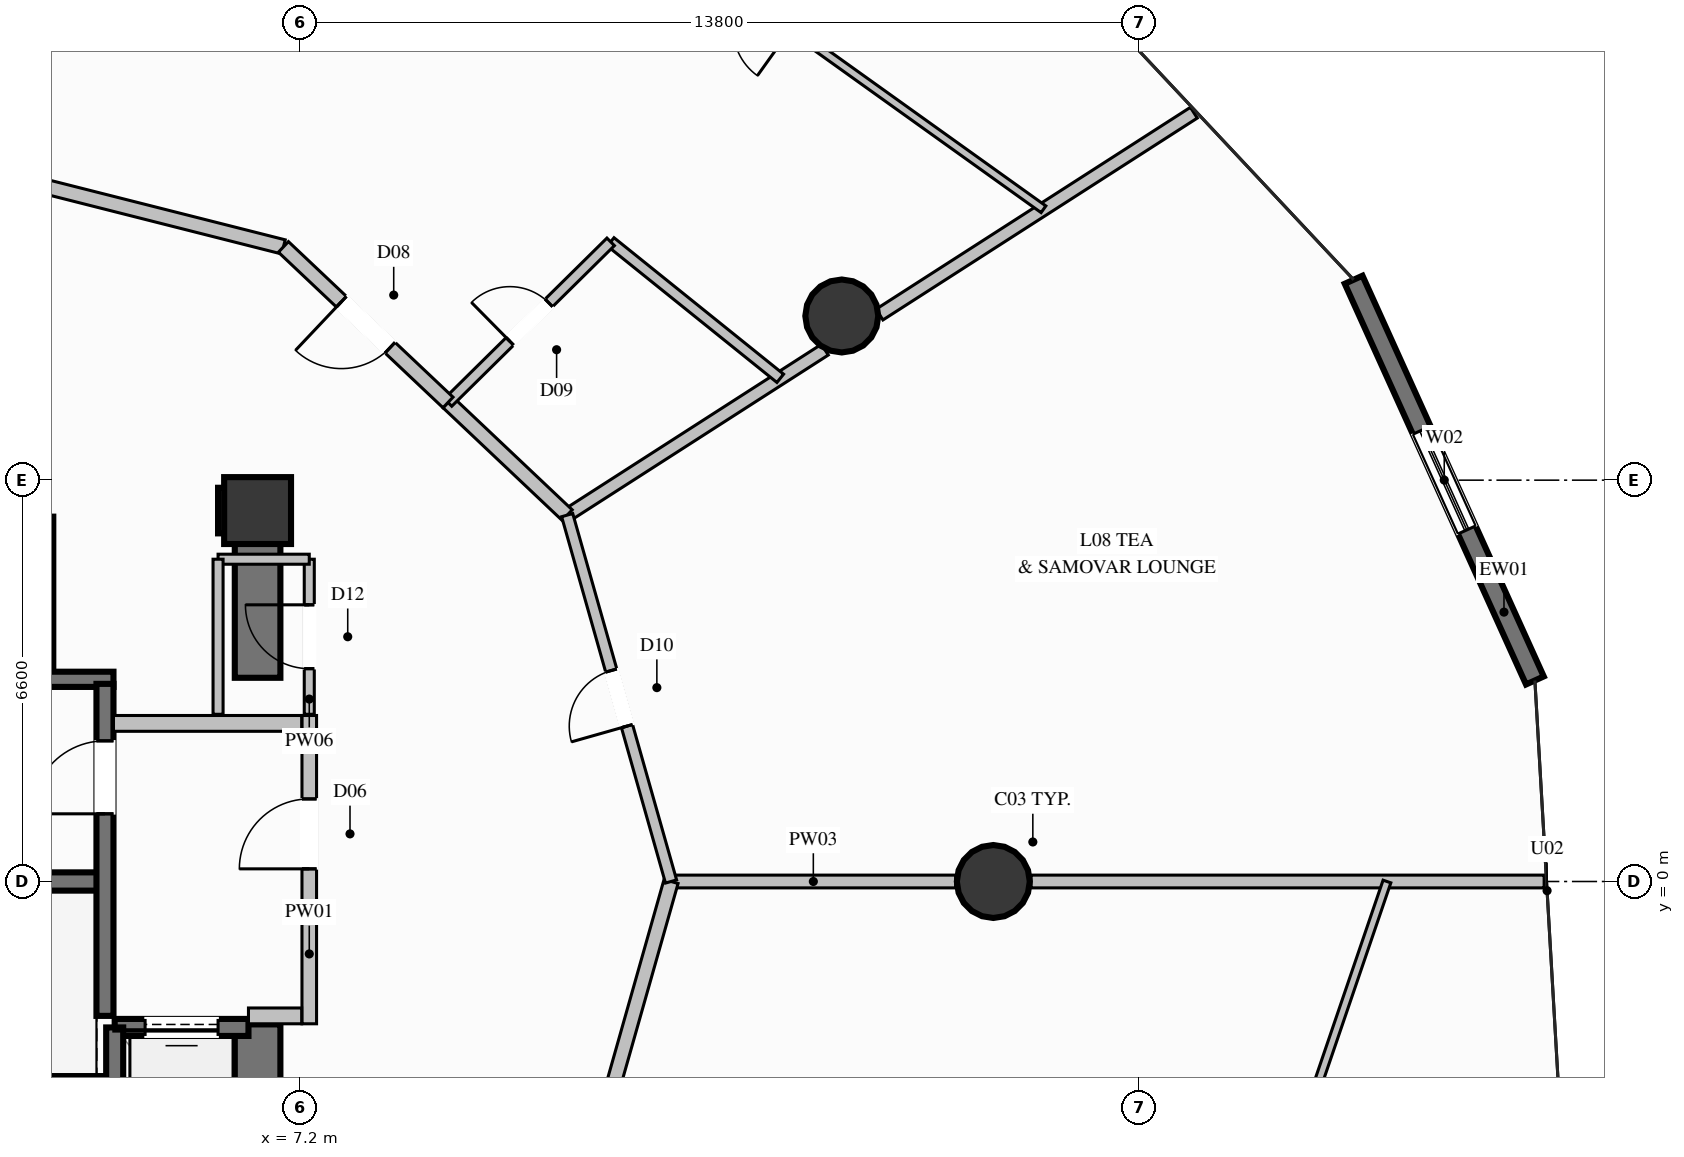
"""IFC4 building model, lengths in metres.
Left out: names, types, materials, properties, quantities, classifications, styles, units other than length and angle.
Written with IfcOpenShell. Run it as: python <this file> out.ifc"""

import sys

from ifc_helpers import new_model, si_unit, direction, frame, frame_2d, origin, origin_2d, place, context, subcontext, project, spatial, rectangle, circle, extrude, element, fill, save


model = new_model("IFC4")
c1 = context("Model", 3, precision=1e-05, world=origin(), true_north=direction((0.0, 1.0)))
c2 = subcontext(c1, "Body", "Model", "MODEL_VIEW")
j1 = project(units=[si_unit("LENGTHUNIT", "METRE"), si_unit("PLANEANGLEUNIT", "RADIAN")], contexts=[c1])
p1 = place(None, origin())
s1 = spatial("IfcSite", under=j1, at=p1, CompositionType="ELEMENT")
p2 = place(p1, origin())
s2 = spatial("IfcBuilding", under=s1, at=p2, CompositionType="ELEMENT")
p3 = place(p2, frame((0.0, 0.0, 39.2)))
s3 = spatial("IfcBuildingStorey", under=s2, at=p3, CompositionType="ELEMENT", Elevation=39.2)
p4 = place(p3, frame((6.5, 6.1, 0.0), z_axis=(0.0, 0.0, 1.0), x_axis=(1.0, 0.0, 0.0)))
e1 = element("IfcColumn", 1, at=p4, inside=s3, PredefinedType="COLUMN", context=c2, shape_type="SweptSolid", body=[
    extrude(rectangle(XDim=1.1, YDim=1.1, at=origin_2d()), origin(), (0.0, 0.0, 1.0), 3.6),
])
p5 = place(p3, frame((-3.99, 0.0, 0.0), z_axis=(0.0, 0.0, 1.0), x_axis=(1.0, 0.0, 0.0)))
e2 = element("IfcWall", 2, at=p5, inside=s3, PredefinedType="SHEAR", context=c2, shape_type="SweptSolid", body=[
    extrude(rectangle(XDim=7.98, YDim=0.3, at=frame_2d((3.99, 0.0))), origin(), (0.0, 0.0, 1.0), 3.6),
])
for number, where, z_axis, x_axis in (
    (3, (-4.13, -3.325, 0.0), (0.0, 0.0, 1.0), (1.0, 0.0, 0.0)),
    (4, (-4.13, 3.325, 0.0), (0.0, 0.0, 1.0), (1.0, 0.0, 0.0)),
):
    element("IfcWall", number, at=place(p3, frame(where, z_axis=z_axis, x_axis=x_axis)), inside=s3, PredefinedType="SOLIDWALL", context=c2, shape_type="SweptSolid", body=[
        extrude(rectangle(XDim=8.26, YDim=0.25, at=frame_2d((4.13, 0.0))), origin(), (0.0, 0.0, 1.0), 3.6),
    ])
p6 = place(p3, frame((5.85, 6.1, 0.0), z_axis=(0.0, 0.0, 1.0), x_axis=(1.0, 0.0, 0.0)))
e5 = element("IfcWall", 5, at=p6, inside=s3, PredefinedType="SHEAR", context=c2, shape_type="SweptSolid", body=[
    extrude(rectangle(XDim=0.275, YDim=0.75, at=frame_2d((0.137, 0.0))), origin(), (0.0, 0.0, 1.0), 3.6),
])
p7 = place(p3, frame((6.5, -6.475, 0.0), z_axis=(0.0, 0.0, 1.0), x_axis=(0.0, 1.0, 0.0)))
e6 = element("IfcWall", 6, at=p7, inside=s3, PredefinedType="SHEAR", context=c2, shape_type="SweptSolid", body=[
    extrude(rectangle(XDim=4.125, YDim=0.75, at=frame_2d((2.062, 0.0))), origin(), (0.0, 0.0, 1.0), 3.6),
])
p8 = place(p3, frame((6.5, 3.35, 0.0), z_axis=(0.0, 0.0, 1.0), x_axis=(0.0, 1.0, 0.0)))
e7 = element("IfcWall", 7, at=p8, inside=s3, PredefinedType="SHEAR", context=c2, shape_type="SweptSolid", body=[
    extrude(rectangle(XDim=3.125, YDim=0.75, at=frame_2d((1.562, 0.0))), origin(), (0.0, 0.0, 1.0), 3.6),
])
for number, where, z_axis, x_axis in (
    (8, (18.6, 0.0, 0.0), (0.0, 0.0, 1.0), (1.0, 0.0, 0.0)),
    (9, (16.108, 9.3, 0.0), (0.0, 0.0, 1.0), (1.0, 0.0, 0.0)),
):
    element("IfcColumn", number, at=place(p3, frame(where, z_axis=z_axis, x_axis=x_axis)), inside=s3, PredefinedType="COLUMN", context=c2, shape_type="SweptSolid", body=[
        extrude(circle(Radius=0.6, at=origin_2d()), origin(), (0.0, 0.0, 1.0), 3.6),
    ])
p9 = place(p3, frame((24.526, 9.896, 0.0), z_axis=(0.0, 0.0, 1.0), x_axis=(0.412164534208, -0.911109431814, 0.0)))
e10 = element("IfcWall", 10, at=p9, inside=s3, PredefinedType="SOLIDWALL", context=c2, shape_type="SweptSolid", body=[
    extrude(rectangle(XDim=7.233, YDim=0.32, at=frame_2d((3.617, 0.0))), origin(), (0.0, 0.0, 1.0), 3.34),
])
p10 = place(p9, frame((2.716, 0.0, 0.35)))
e11 = element("IfcOpeningElement", 11, at=p10, cuts=e10, PredefinedType="OPENING", context=c2, shape_type="SweptSolid", body=[
    extrude(rectangle(XDim=1.8, YDim=2.6, at=frame_2d((0.9, 1.3))), frame((0.0, 0.17, 0.0), z_axis=(0.0, -1.0, 0.0), x_axis=(1.0, 0.0, 0.0)), (0.0, 0.0, 1.0), 0.34),
])
p11 = place(p3, frame((3.0, 3.5, 0.0), z_axis=(0.0, 0.0, 1.0), x_axis=(0.0, 1.0, 0.0)))
e12 = element("IfcWall", 12, at=p11, inside=s3, PredefinedType="SOLIDWALL", context=c2, shape_type="SweptSolid", body=[
    extrude(rectangle(XDim=2.5, YDim=0.28, at=frame_2d((1.25, 0.0))), origin(), (0.0, 0.0, 1.0), 3.34),
])
p12 = place(p3, frame((6.35, -2.4, 0.0), z_axis=(0.0, 0.0, 1.0), x_axis=(-1.0, 0.0, 0.0)))
e13 = element("IfcWall", 13, at=p12, inside=s3, PredefinedType="SOLIDWALL", context=c2, shape_type="SweptSolid", body=[
    extrude(rectangle(XDim=2.2, YDim=0.28, at=frame_2d((1.1, 0.0))), origin(), (0.0, 0.0, 1.0), 3.34),
])
p13 = place(p12, frame((0.5, 0.0, 0.0)))
e14 = element("IfcOpeningElement", 14, at=p13, cuts=e13, PredefinedType="OPENING", context=c2, shape_type="SweptSolid", body=[
    extrude(rectangle(XDim=1.2, YDim=2.2, at=frame_2d((0.6, 1.1))), frame((0.0, 0.15, 0.0), z_axis=(0.0, -1.0, 0.0), x_axis=(1.0, 0.0, 0.0)), (0.0, 0.0, 1.0), 0.3),
])
p14 = place(p3, frame((4.15, -2.4, 0.0), z_axis=(0.0, 0.0, 1.0), x_axis=(0.0, -1.0, 0.0)))
e15 = element("IfcWall", 15, at=p14, inside=s3, PredefinedType="SOLIDWALL", context=c2, shape_type="SweptSolid", body=[
    extrude(rectangle(XDim=2.7, YDim=0.28, at=frame_2d((1.35, 0.0))), origin(), (0.0, 0.0, 1.0), 3.34),
])
p15 = place(p3, frame((3.99, -2.21, 0.0), z_axis=(0.0, 0.0, 1.0), x_axis=(0.0, 1.0, 0.0)))
e16 = element("IfcWall", 16, at=p15, inside=s3, PredefinedType="SOLIDWALL", context=c2, shape_type="SweptSolid", body=[
    extrude(rectangle(XDim=5.46, YDim=0.28, at=frame_2d((2.73, 0.0))), origin(), (0.0, 0.0, 1.0), 3.34),
])
p16 = place(p15, frame((3.323, 0.0, 0.0)))
e17 = element("IfcOpeningElement", 17, at=p16, cuts=e16, PredefinedType="OPENING", context=c2, shape_type="SweptSolid", body=[
    extrude(rectangle(XDim=1.2, YDim=2.2, at=frame_2d((0.6, 1.1))), frame((0.0, 0.15, 0.0), z_axis=(0.0, -1.0, 0.0), x_axis=(1.0, 0.0, 0.0)), (0.0, 0.0, 1.0), 0.3),
])
p17 = place(p3, frame((7.35, -2.34, 0.0), z_axis=(0.0, 0.0, 1.0), x_axis=(0.0, 1.0, 0.0)))
e18 = element("IfcWall", 18, at=p17, inside=s3, PredefinedType="PARTITIONING", context=c2, shape_type="SweptSolid", body=[
    extrude(rectangle(XDim=5.07, YDim=0.24, at=frame_2d((2.535, 0.0))), origin(), (0.0, 0.0, 1.0), 2.425),
])
p18 = place(p17, frame((2.548, 0.0, 0.0)))
e19 = element("IfcOpeningElement", 19, at=p18, cuts=e18, PredefinedType="OPENING", context=c2, shape_type="SweptSolid", body=[
    extrude(rectangle(XDim=1.15, YDim=2.2, at=frame_2d((0.575, 1.1))), frame((0.0, 0.13, 0.0), z_axis=(0.0, -1.0, 0.0), x_axis=(1.0, 0.0, 0.0)), (0.0, 0.0, 1.0), 0.26),
])
p19 = place(p3, frame((6.35, -2.21, 0.0), z_axis=(0.0, 0.0, 1.0), x_axis=(1.0, 0.0, 0.0)))
e20 = element("IfcWall", 20, at=p19, inside=s3, PredefinedType="PARTITIONING", context=c2, shape_type="SweptSolid", body=[
    extrude(rectangle(XDim=0.875, YDim=0.26, at=frame_2d((0.438, 0.0))), origin(), (0.0, 0.0, 1.0), 3.34),
])
p20 = place(p3, frame((4.13, 2.6, 0.0), z_axis=(0.0, 0.0, 1.0), x_axis=(1.0, 0.0, 0.0)))
e21 = element("IfcWall", 21, at=p20, inside=s3, PredefinedType="PARTITIONING", context=c2, shape_type="SweptSolid", body=[
    extrude(rectangle(XDim=3.095, YDim=0.26, at=frame_2d((1.548, 0.0))), origin(), (0.0, 0.0, 1.0), 3.34),
])
p21 = place(p3, frame((7.35, 2.75, 0.0), z_axis=(0.0, 0.0, 1.0), x_axis=(0.0, 1.0, 0.0)))
e22 = element("IfcWall", 22, at=p21, inside=s3, PredefinedType="PARTITIONING", context=c2, shape_type="SweptSolid", body=[
    extrude(rectangle(XDim=2.55, YDim=0.165, at=frame_2d((1.275, 0.0))), origin(), (0.0, 0.0, 1.0), 3.34),
])
p22 = place(p21, frame((0.75, 0.0, 0.0)))
e23 = element("IfcOpeningElement", 23, at=p22, cuts=e22, PredefinedType="OPENING", context=c2, shape_type="SweptSolid", body=[
    extrude(rectangle(XDim=1.05, YDim=2.15, at=frame_2d((0.525, 1.075))), frame((0.0, 0.093, 0.0), z_axis=(0.0, -1.0, 0.0), x_axis=(1.0, 0.0, 0.0)), (0.0, 0.0, 1.0), 0.185),
])
p23 = place(p3, frame((7.35, 5.3, 0.0), z_axis=(0.0, 0.0, 1.0), x_axis=(-1.0, 0.0, 0.0)))
e24 = element("IfcWall", 24, at=p23, inside=s3, PredefinedType="PARTITIONING", context=c2, shape_type="SweptSolid", body=[
    extrude(rectangle(XDim=1.5, YDim=0.165, at=frame_2d((0.75, 0.0))), origin(), (0.0, 0.0, 1.0), 2.425),
])
p24 = place(p3, frame((5.85, 5.3, 0.0), z_axis=(0.0, 0.0, 1.0), x_axis=(0.0, -1.0, 0.0)))
e25 = element("IfcWall", 25, at=p24, inside=s3, PredefinedType="PARTITIONING", context=c2, shape_type="SweptSolid", body=[
    extrude(rectangle(XDim=2.55, YDim=0.165, at=frame_2d((1.275, 0.0))), origin(), (0.0, 0.0, 1.0), 2.425),
])
p25 = place(p3, frame((13.3, 0.0, 0.0), z_axis=(0.0, 0.0, 1.0), x_axis=(1.0, 0.0, 0.0)))
e26 = element("IfcWall", 26, at=p25, inside=s3, PredefinedType="PARTITIONING", context=c2, shape_type="SweptSolid", body=[
    extrude(rectangle(XDim=4.68, YDim=0.21, at=frame_2d((2.34, 0.0))), origin(), (0.0, 0.0, 1.0), 2.709),
])
p26 = place(p3, frame((19.22, 0.0, 0.0), z_axis=(0.0, 0.0, 1.0), x_axis=(1.0, 0.0, 0.0)))
e27 = element("IfcWall", 27, at=p26, inside=s3, PredefinedType="PARTITIONING", context=c2, shape_type="SweptSolid", body=[
    extrude(rectangle(XDim=8.439, YDim=0.21, at=frame_2d((4.219, 0.0))), origin(), (0.0, 0.0, 1.0), 3.34),
])
p27 = place(p3, frame((11.592, 6.025, 0.0), z_axis=(0.0, 0.0, 1.0), x_axis=(0.841416256493, 0.540387530675, 0.0)))
e28 = element("IfcWall", 28, at=p27, inside=s3, PredefinedType="PARTITIONING", context=c2, shape_type="SweptSolid", body=[
    extrude(rectangle(XDim=5.036, YDim=0.21, at=frame_2d((2.518, 0.0))), origin(), (0.0, 0.0, 1.0), 2.709),
])
p28 = place(p3, frame((16.728, 9.323, 0.0), z_axis=(0.0, 0.0, 1.0), x_axis=(0.841434006825, 0.54035989133, 0.0)))
e29 = element("IfcWall", 29, at=p28, inside=s3, PredefinedType="PARTITIONING", context=c2, shape_type="SweptSolid", body=[
    extrude(rectangle(XDim=6.144, YDim=0.21, at=frame_2d((3.072, 0.0))), origin(), (0.0, 0.0, 1.0), 3.34),
])
p29 = place(p3, frame((11.592, 6.025, 0.0), z_axis=(0.0, 0.0, 1.0), x_axis=(-0.726651583854, 0.687006168591, 0.0)))
e30 = element("IfcWall", 30, at=p29, inside=s3, PredefinedType="PARTITIONING", context=c2, shape_type="SweptSolid", body=[
    extrude(rectangle(XDim=2.697, YDim=0.24, at=frame_2d((1.349, 0.0))), origin(), (0.0, 0.0, 1.0), 3.34),
])
p30 = place(p3, frame((15.096, 8.275, 0.0), z_axis=(0.0, 0.0, 1.0), x_axis=(-0.779109173808, 0.626888263799, 0.0)))
e31 = element("IfcWall", 31, at=p30, inside=s3, PredefinedType="PLUMBINGWALL", context=c2, shape_type="SweptSolid", body=[
    extrude(rectangle(XDim=3.58, YDim=0.175, at=frame_2d((1.79, 0.0))), origin(), (0.0, 0.0, 1.0), 3.34),
])
p31 = place(p3, frame((9.632, 7.878, 0.0), z_axis=(0.0, 0.0, 1.0), x_axis=(0.711574015507, 0.702611144556, 0.0)))
e32 = element("IfcWall", 32, at=p31, inside=s3, PredefinedType="PLUMBINGWALL", context=c2, shape_type="SweptSolid", body=[
    extrude(rectangle(XDim=3.759, YDim=0.175, at=frame_2d((1.879, 0.0))), origin(), (0.0, 0.0, 1.0), 3.34),
])
p32 = place(p31, frame((1.43, 0.0, 0.0)))
e33 = element("IfcOpeningElement", 33, at=p32, cuts=e32, PredefinedType="OPENING", context=c2, shape_type="SweptSolid", body=[
    extrude(rectangle(XDim=0.9, YDim=2.1, at=frame_2d((0.45, 1.05))), frame((0.0, 0.098, 0.0), z_axis=(0.0, -1.0, 0.0), x_axis=(1.0, 0.0, 0.0)), (0.0, 0.0, 1.0), 0.195),
])
p33 = place(p3, frame((6.925, 10.436, 0.0), z_axis=(0.0, 0.0, 1.0), x_axis=(-0.969413132073, 0.245434674331, 0.0)))
e34 = element("IfcWall", 34, at=p33, inside=s3, PredefinedType="PARTITIONING", context=c2, shape_type="SweptSolid", body=[
    extrude(rectangle(XDim=6.576, YDim=0.24, at=frame_2d((3.288, 0.0))), origin(), (0.0, 0.0, 1.0), 3.34),
])
p34 = place(p3, frame((9.632, 7.878, 0.0), z_axis=(0.0, 0.0, 1.0), x_axis=(-0.726816794063, 0.686831382413, 0.0)))
e35 = element("IfcWall", 35, at=p34, inside=s3, PredefinedType="PARTITIONING", context=c2, shape_type="SweptSolid", body=[
    extrude(rectangle(XDim=3.725, YDim=0.24, at=frame_2d((1.862, 0.0))), origin(), (0.0, 0.0, 1.0), 3.34),
])
p35 = place(p34, frame((1.312, 0.0, 0.0)))
e36 = element("IfcOpeningElement", 36, at=p35, cuts=e35, PredefinedType="OPENING", context=c2, shape_type="SweptSolid", body=[
    extrude(rectangle(XDim=1.1, YDim=2.3, at=frame_2d((0.55, 1.15))), frame((0.0, 0.13, 0.0), z_axis=(0.0, -1.0, 0.0), x_axis=(1.0, 0.0, 0.0)), (0.0, 0.0, 1.0), 0.26),
])
p36 = place(p3, frame((19.425, 11.055, 0.0), z_axis=(0.0, 0.0, 1.0), x_axis=(-0.813402257194, 0.581701614224, 0.0)))
e37 = element("IfcWall", 37, at=p36, inside=s3, PredefinedType="PARTITIONING", context=c2, shape_type="SweptSolid", body=[
    extrude(rectangle(XDim=11.161, YDim=0.135, at=frame_2d((5.58, 0.0))), origin(), (0.0, 0.0, 1.0), 3.34),
])
p37 = place(p36, frame((5.105, 0.0, 0.0)))
e38 = element("IfcOpeningElement", 38, at=p37, cuts=e37, PredefinedType="OPENING", context=c2, shape_type="SweptSolid", body=[
    extrude(rectangle(XDim=0.95, YDim=2.1, at=frame_2d((0.475, 1.05))), frame((0.0, 0.078, 0.0), z_axis=(0.0, -1.0, 0.0), x_axis=(1.0, 0.0, 0.0)), (0.0, 0.0, 1.0), 0.155),
])
p38 = place(p3, frame((11.592, -6.025, 0.0), z_axis=(0.0, 0.0, 1.0), x_axis=(0.272743314702, 0.962086838225, 0.0)))
e39 = element("IfcWall", 39, at=p38, inside=s3, PredefinedType="PARTITIONING", context=c2, shape_type="SweptSolid", body=[
    extrude(rectangle(XDim=6.262, YDim=0.24, at=frame_2d((3.131, 0.0))), origin(), (0.0, 0.0, 1.0), 3.34),
])
p39 = place(p3, frame((20.978, -11.991, 0.0), z_axis=(0.0, 0.0, 1.0), x_axis=(0.323247804531, 0.946314354148, 0.0)))
e40 = element("IfcWall", 40, at=p39, inside=s3, PredefinedType="PARTITIONING", context=c2, shape_type="SweptSolid", body=[
    extrude(rectangle(XDim=12.671, YDim=0.135, at=frame_2d((6.335, 0.0))), origin(), (0.0, 0.0, 1.0), 3.34),
])
p40 = place(p39, frame((5.861, 0.0, 0.0)))
e41 = element("IfcOpeningElement", 41, at=p40, cuts=e40, PredefinedType="OPENING", context=c2, shape_type="SweptSolid", body=[
    extrude(rectangle(XDim=0.95, YDim=2.1, at=frame_2d((0.475, 1.05))), frame((0.0, 0.078, 0.0), z_axis=(0.0, -1.0, 0.0), x_axis=(1.0, 0.0, 0.0)), (0.0, 0.0, 1.0), 0.155),
])
p41 = place(p3, frame((13.3, 0.0, 0.0), z_axis=(0.0, 0.0, 1.0), x_axis=(-0.272743314702, 0.962086838225, 0.0)))
e42 = element("IfcWall", 42, at=p41, inside=s3, PredefinedType="PARTITIONING", context=c2, shape_type="SweptSolid", body=[
    extrude(rectangle(XDim=6.262, YDim=0.19, at=frame_2d((3.131, 0.0))), origin(), (0.0, 0.0, 1.0), 3.34),
])
p42 = place(p41, frame((2.656, 0.0, 0.0)))
e43 = element("IfcOpeningElement", 43, at=p42, cuts=e42, PredefinedType="OPENING", context=c2, shape_type="SweptSolid", body=[
    extrude(rectangle(XDim=0.95, YDim=2.1, at=frame_2d((0.475, 1.05))), frame((0.0, 0.105, 0.0), z_axis=(0.0, -1.0, 0.0), x_axis=(1.0, 0.0, 0.0)), (0.0, 0.0, 1.0), 0.21),
])
p43 = place(p10, origin())
e44 = element("IfcWindow", 44, at=p43, inside=s3, PartitioningType="SINGLE_PANEL", PredefinedType="WINDOW", context=c2, shape_type="SweptSolid", body=[
    extrude(rectangle(XDim=1.8, YDim=2.6, at=frame_2d((0.9, 1.3))), frame((0.0, 0.03, 0.0), z_axis=(0.0, -1.0, 0.0), x_axis=(1.0, 0.0, 0.0)), (0.0, 0.0, 1.0), 0.06),
])
fill(e11, e44)
p44 = place(p13, origin())
e45 = element("IfcDoor", 45, at=p44, inside=s3, OperationType="SLIDING_TO_LEFT", PredefinedType="DOOR", context=c2, shape_type="SweptSolid", body=[
    extrude(rectangle(XDim=1.2, YDim=2.2, at=frame_2d((0.6, 1.1))), frame((0.0, 0.025, 0.0), z_axis=(0.0, -1.0, 0.0), x_axis=(1.0, 0.0, 0.0)), (0.0, 0.0, 1.0), 0.05),
])
fill(e14, e45)
p45 = place(p16, origin())
e46 = element("IfcDoor", 46, at=p45, inside=s3, OperationType="SINGLE_SWING_LEFT", PredefinedType="DOOR", context=c2, shape_type="SweptSolid", body=[
    extrude(rectangle(XDim=1.2, YDim=2.2, at=frame_2d((0.6, 1.1))), frame((0.0, 0.025, 0.0), z_axis=(0.0, -1.0, 0.0), x_axis=(1.0, 0.0, 0.0)), (0.0, 0.0, 1.0), 0.05),
])
fill(e17, e46)
p46 = place(p18, origin())
e47 = element("IfcDoor", 47, at=p46, inside=s3, OperationType="SINGLE_SWING_LEFT", PredefinedType="DOOR", context=c2, shape_type="SweptSolid", body=[
    extrude(rectangle(XDim=1.15, YDim=2.2, at=frame_2d((0.575, 1.1))), frame((0.0, 0.025, 0.0), z_axis=(0.0, -1.0, 0.0), x_axis=(1.0, 0.0, 0.0)), (0.0, 0.0, 1.0), 0.05),
])
fill(e19, e47)
p47 = place(p22, origin())
e48 = element("IfcDoor", 48, at=p47, inside=s3, OperationType="SINGLE_SWING_RIGHT", PredefinedType="DOOR", context=c2, shape_type="SweptSolid", body=[
    extrude(rectangle(XDim=1.05, YDim=2.15, at=frame_2d((0.525, 1.075))), frame((0.0, 0.025, 0.0), z_axis=(0.0, -1.0, 0.0), x_axis=(1.0, 0.0, 0.0)), (0.0, 0.0, 1.0), 0.05),
])
fill(e23, e48)
p48 = place(p32, origin())
e49 = element("IfcDoor", 49, at=p48, inside=s3, OperationType="SINGLE_SWING_LEFT", PredefinedType="DOOR", context=c2, shape_type="SweptSolid", body=[
    extrude(rectangle(XDim=0.9, YDim=2.1, at=frame_2d((0.45, 1.05))), frame((0.0, 0.025, 0.0), z_axis=(0.0, -1.0, 0.0), x_axis=(1.0, 0.0, 0.0)), (0.0, 0.0, 1.0), 0.05),
])
fill(e33, e49)
p49 = place(p35, origin())
e50 = element("IfcDoor", 50, at=p49, inside=s3, OperationType="SINGLE_SWING_RIGHT", PredefinedType="DOOR", context=c2, shape_type="SweptSolid", body=[
    extrude(rectangle(XDim=1.1, YDim=2.3, at=frame_2d((0.55, 1.15))), frame((0.0, 0.025, 0.0), z_axis=(0.0, -1.0, 0.0), x_axis=(1.0, 0.0, 0.0)), (0.0, 0.0, 1.0), 0.05),
])
fill(e36, e50)
p50 = place(p42, origin())
e51 = element("IfcDoor", 51, at=p50, inside=s3, OperationType="SINGLE_SWING_LEFT", PredefinedType="DOOR", context=c2, shape_type="SweptSolid", body=[
    extrude(rectangle(XDim=0.95, YDim=2.1, at=frame_2d((0.475, 1.05))), frame((0.0, 0.025, 0.0), z_axis=(0.0, -1.0, 0.0), x_axis=(1.0, 0.0, 0.0)), (0.0, 0.0, 1.0), 0.05),
])
fill(e43, e51)
save(model, sys.argv[1])
